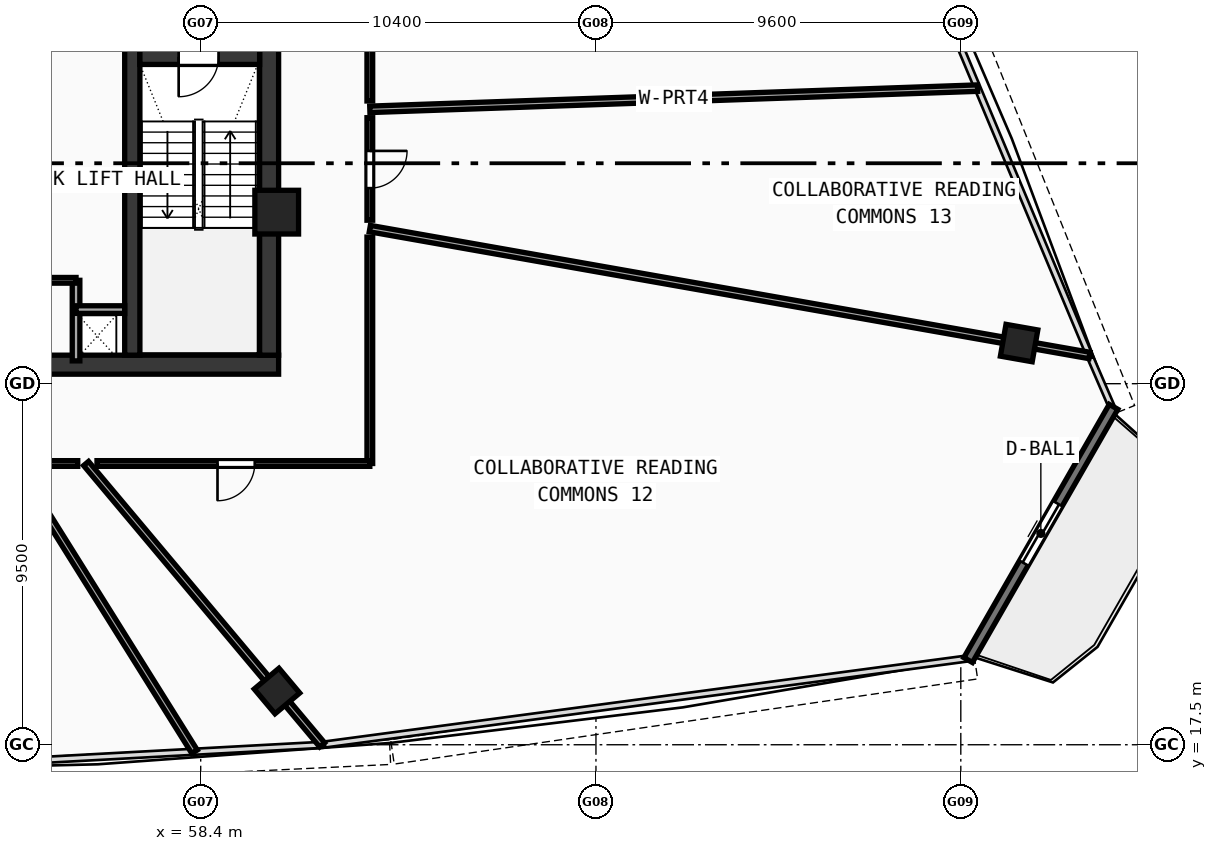
"""IFC4 building model, lengths in metres.
Left out: names, types, materials, properties, quantities, classifications, styles, units other than length and angle.
Written with IfcOpenShell. Run it as: python <this file> out.ifc"""

import sys

from ifc_helpers import new_model, si_unit, direction, frame, frame_2d, origin, origin_with_axes, origin_2d, place, context, subcontext, project, spatial, rectangle, hollow_rectangle, extrude, source, transform, mapped, element, fill, save


model = new_model("IFC4")
c1 = context("Model", 3, precision=1e-05, world=origin(), true_north=direction((0.0, 1.0)))
c2 = subcontext(c1, "Body", "Model", "MODEL_VIEW")
j1 = project(units=[si_unit("LENGTHUNIT", "METRE"), si_unit("PLANEANGLEUNIT", "RADIAN")], contexts=[c1])
p1 = place(None, origin())
s1 = spatial("IfcSite", under=j1, at=p1, CompositionType="ELEMENT")
p2 = place(p1, origin())
s2 = spatial("IfcBuilding", under=s1, at=p2, CompositionType="ELEMENT")
p3 = place(p2, frame((0.0, 0.0, 255.72)))
s3 = spatial("IfcBuildingStorey", under=s2, at=p3, CompositionType="ELEMENT", Elevation=255.72)
p4 = place(p3, frame((35.55, 27.5, 0.0), z_axis=(0.0, 0.0, 1.0), x_axis=(1.0, 0.0, 0.0)))
e1 = element("IfcWall", 1, at=p4, inside=s3, PredefinedType="SHEAR", context=c2, shape_type="SweptSolid", body=[
    extrude(rectangle(XDim=24.9, YDim=0.5, at=frame_2d((12.45, 0.0))), origin(), (0.0, 0.0, 1.0), 3.47),
])
p5 = place(p3, frame((60.2, 27.75, 0.0), z_axis=(0.0, 0.0, 1.0), x_axis=(0.0, 1.0, 0.0)))
e2 = element("IfcWall", 2, at=p5, inside=s3, PredefinedType="SHEAR", context=c2, shape_type="SweptSolid", body=[
    extrude(rectangle(XDim=12.2, YDim=0.5, at=frame_2d((6.1, 0.0))), origin(), (0.0, 0.0, 1.0), 3.47),
])
p6 = place(p3, frame((56.6, 27.75, 0.0), z_axis=(0.0, 0.0, 1.0), x_axis=(0.0, 1.0, 0.0)))
e3 = element("IfcWall", 3, at=p6, inside=s3, PredefinedType="SHEAR", context=c2, shape_type="SweptSolid", body=[
    extrude(rectangle(XDim=12.2, YDim=0.4, at=frame_2d((6.1, 0.0))), origin(), (0.0, 0.0, 1.0), 3.47),
])
p7 = place(p6, frame((10.0, 0.0, 0.0)))
e4 = element("IfcOpeningElement", 4, at=p7, cuts=e3, PredefinedType="OPENING", context=c2, shape_type="SweptSolid", body=[
    extrude(rectangle(XDim=1.1, YDim=2.1, at=frame_2d((0.55, 1.05))), frame((0.0, 0.21, 0.0), z_axis=(0.0, -1.0, 0.0), x_axis=(1.0, 0.0, 0.0)), (0.0, 0.0, 1.0), 0.42),
])
p8 = place(p3, frame((56.8, 35.6, 0.0), z_axis=(0.0, 0.0, 1.0), x_axis=(1.0, 0.0, 0.0)))
e5 = element("IfcWall", 5, at=p8, inside=s3, PredefinedType="SHEAR", context=c2, shape_type="SweptSolid", body=[
    extrude(rectangle(XDim=3.15, YDim=0.4, at=frame_2d((1.575, 0.0))), origin(), (0.0, 0.0, 1.0), 3.47),
])
p9 = place(p8, frame((1.02, 0.0, 0.0)))
e6 = element("IfcOpeningElement", 6, at=p9, cuts=e5, PredefinedType="OPENING", context=c2, shape_type="SweptSolid", body=[
    extrude(rectangle(XDim=1.05, YDim=2.1, at=frame_2d((0.525, 1.05))), frame((0.0, 0.21, 0.0), z_axis=(0.0, -1.0, 0.0), x_axis=(1.0, 0.0, 0.0)), (0.0, 0.0, 1.0), 0.42),
])
m1 = source(origin(), c2, "Body", "SweptSolid", [
    extrude(hollow_rectangle(XDim=1.15, YDim=1.15, WallThickness=0.048, at=origin_2d()), origin(), (0.0, 0.0, 1.0), 3.73),
])
p10 = place(p3, frame((60.4, 31.513, -0.26), z_axis=(0.0, 0.0, 1.0), x_axis=(1.0, 0.0, 0.0)))
e7 = element("IfcColumn", 7, at=p10, inside=s3, PredefinedType="COLUMN", context=c2, shape_type="MappedRepresentation", body=[
    mapped(m1, transform((0.0, 0.0, 0.0), scale=1.0)),
])
m2 = source(origin(), c2, "Body", "SweptSolid", [
    extrude(hollow_rectangle(XDim=0.85, YDim=0.85, WallThickness=0.034, at=origin_2d()), origin(), (0.0, 0.0, 1.0), 3.73),
])
for number, where, z_axis, x_axis in (
    (8, (60.407, 18.914, -0.26), (0.0, 0.0, 1.0), (0.766, 0.643, 0.0)),
    (9, (79.934, 28.069, -0.26), (0.0, 0.0, 1.0), (0.174, 0.985, 0.0)),
):
    element("IfcColumn", number, at=place(p3, frame(where, z_axis=z_axis, x_axis=x_axis)), inside=s3, PredefinedType="COLUMN", context=c2, shape_type="MappedRepresentation", body=[
        mapped(m2, transform((0.0, 0.0, 0.0), scale=1.0)),
    ])
p11 = place(p3, frame((78.593, 19.729, 0.0), z_axis=(0.0, 0.0, 1.0), x_axis=(0.497934343816, 0.867214730761, 0.0)))
e10 = element("IfcWall", 10, at=p11, inside=s3, PredefinedType="STANDARD", context=c2, shape_type="SweptSolid", body=[
    extrude(rectangle(XDim=7.684, YDim=0.26, at=frame_2d((3.842, 0.0))), origin(), (0.0, 0.0, 1.0), 3.47),
])
p12 = place(p11, frame((2.942, 0.0, 0.0)))
e11 = element("IfcOpeningElement", 11, at=p12, cuts=e10, PredefinedType="OPENING", context=c2, shape_type="SweptSolid", body=[
    extrude(rectangle(XDim=1.8, YDim=2.15, at=frame_2d((0.9, 1.075))), frame((0.0, 0.14, 0.0), z_axis=(0.0, -1.0, 0.0), x_axis=(1.0, 0.0, 0.0)), (0.0, 0.0, 1.0), 0.28),
])
p13 = place(p3, frame((55.12, 27.6, 0.0), z_axis=(0.0, 0.0, 1.0), x_axis=(0.0, 1.0, 0.0)))
e12 = element("IfcWall", 12, at=p13, inside=s3, PredefinedType="SOLIDWALL", context=c2, shape_type="SweptSolid", body=[
    extrude(rectangle(XDim=2.12, YDim=0.2, at=frame_2d((1.06, 0.0))), origin(), (0.0, 0.0, 1.0), 3.47),
])
p14 = place(p3, frame((55.12, 28.95, 0.0), z_axis=(0.0, 0.0, 1.0), x_axis=(1.0, 0.0, 0.0)))
e13 = element("IfcWall", 13, at=p14, inside=s3, PredefinedType="SOLIDWALL", context=c2, shape_type="SweptSolid", body=[
    extrude(rectangle(XDim=1.28, YDim=0.2, at=frame_2d((0.64, 0.0))), origin(), (0.0, 0.0, 1.0), 3.47),
])
p15 = place(p3, frame((51.05, 29.72, 0.0), z_axis=(0.0, 0.0, 1.0), x_axis=(1.0, 0.0, 0.0)))
e14 = element("IfcWall", 14, at=p15, inside=s3, PredefinedType="PARTITIONING", context=c2, shape_type="SweptSolid", body=[
    extrude(rectangle(XDim=4.07, YDim=0.15, at=frame_2d((2.035, 0.0))), origin(), (0.0, 0.0, 1.0), 3.47),
])
p16 = place(p15, frame((0.5, 0.0, 0.0)))
e15 = element("IfcOpeningElement", 15, at=p16, cuts=e14, PredefinedType="OPENING", context=c2, shape_type="SweptSolid", body=[
    extrude(rectangle(XDim=0.9, YDim=2.1, at=frame_2d((0.45, 1.05))), frame((0.0, 0.085, 0.0), z_axis=(0.0, -1.0, 0.0), x_axis=(1.0, 0.0, 0.0)), (0.0, 0.0, 1.0), 0.17),
])
p17 = place(p3, frame((62.85, 34.219, 0.0), z_axis=(0.0, 0.0, 1.0), x_axis=(0.99939049717, 0.034908941063, 0.0)))
e16 = element("IfcWall", 16, at=p17, inside=s3, PredefinedType="PARTITIONING", context=c2, shape_type="SweptSolid", body=[
    extrude(rectangle(XDim=16.001, YDim=0.17, at=frame_2d((8.001, 0.0))), origin(), (0.0, 0.0, 1.0), 2.82),
])
p18 = place(p3, frame((53.499, 24.9, 0.0), z_axis=(0.0, 0.0, 1.0), x_axis=(0.529920411872, -0.848047379031, 0.0)))
e17 = element("IfcWall", 17, at=p18, inside=s3, PredefinedType="PARTITIONING", context=c2, shape_type="SweptSolid", body=[
    extrude(rectangle(XDim=8.943, YDim=0.17, at=frame_2d((4.471, 0.0))), origin(), (0.0, 0.0, 1.0), 2.82),
])
p19 = place(p3, frame((55.384, 24.9, 0.0), z_axis=(0.0, 0.0, 1.0), x_axis=(0.642795010628, -0.766038232931, 0.0)))
e18 = element("IfcWall", 18, at=p19, inside=s3, PredefinedType="PARTITIONING", context=c2, shape_type="SweptSolid", body=[
    extrude(rectangle(XDim=9.663, YDim=0.17, at=frame_2d((4.832, 0.0))), origin(), (0.0, 0.0, 1.0), 2.82),
])
p20 = place(p3, frame((62.85, 31.082, 0.0), z_axis=(0.0, 0.0, 1.0), x_axis=(0.984808346381, -0.173644812474, 0.0)))
e19 = element("IfcWall", 19, at=p20, inside=s3, PredefinedType="PARTITIONING", context=c2, shape_type="SweptSolid", body=[
    extrude(rectangle(XDim=19.228, YDim=0.17, at=frame_2d((9.614, 0.0))), origin(), (0.0, 0.0, 1.0), 2.82),
])
p21 = place(p3, frame((62.85, 38.305, 0.0), z_axis=(0.0, 0.0, 1.0), x_axis=(0.0, -1.0, 0.0)))
e20 = element("IfcWall", 20, at=p21, inside=s3, PredefinedType="PARTITIONING", context=c2, shape_type="SweptSolid", body=[
    extrude(rectangle(XDim=3.867, YDim=0.15, at=frame_2d((1.933, 0.0))), origin(), (0.0, 0.0, 1.0), 3.47),
])
p22 = place(p21, frame((1.473, 0.0, 0.0)))
e21 = element("IfcOpeningElement", 21, at=p22, cuts=e20, PredefinedType="OPENING", context=c2, shape_type="SweptSolid", body=[
    extrude(rectangle(XDim=0.92, YDim=2.1, at=frame_2d((0.46, 1.05))), frame((0.0, 0.085, 0.0), z_axis=(0.0, -1.0, 0.0), x_axis=(1.0, 0.0, 0.0)), (0.0, 0.0, 1.0), 0.17),
])
p23 = place(p3, frame((62.85, 33.999, 0.0), z_axis=(0.0, 0.0, 1.0), x_axis=(0.0, -1.0, 0.0)))
e22 = element("IfcWall", 22, at=p23, inside=s3, PredefinedType="PARTITIONING", context=c2, shape_type="SweptSolid", body=[
    extrude(rectangle(XDim=2.698, YDim=0.15, at=frame_2d((1.349, 0.0))), origin(), (0.0, 0.0, 1.0), 3.47),
])
p24 = place(p23, frame((0.874, 0.0, 0.0)))
e23 = element("IfcOpeningElement", 23, at=p24, cuts=e22, PredefinedType="OPENING", context=c2, shape_type="SweptSolid", body=[
    extrude(rectangle(XDim=0.98, YDim=2.12, at=frame_2d((0.49, 1.06))), frame((0.0, 0.085, 0.0), z_axis=(0.0, -1.0, 0.0), x_axis=(1.0, 0.0, 0.0)), (0.0, 0.0, 1.0), 0.17),
])
p25 = place(p3, frame((62.85, 30.858, 0.0), z_axis=(0.0, 0.0, 1.0), x_axis=(0.0, -1.0, 0.0)))
e24 = element("IfcWall", 24, at=p25, inside=s3, PredefinedType="PARTITIONING", context=c2, shape_type="SweptSolid", body=[
    extrude(rectangle(XDim=5.958, YDim=0.15, at=frame_2d((2.979, 0.0))), origin(), (0.0, 0.0, 1.0), 3.12),
])
p26 = place(p3, frame((62.85, 24.9, 0.0), z_axis=(0.0, 0.0, 1.0), x_axis=(-1.0, 0.0, 0.0)))
e25 = element("IfcWall", 25, at=p26, inside=s3, PredefinedType="PARTITIONING", context=c2, shape_type="SweptSolid", body=[
    extrude(rectangle(XDim=7.179, YDim=0.15, at=frame_2d((3.589, 0.0))), origin(), (0.0, 0.0, 1.0), 3.12),
])
p27 = place(p26, frame((3.028, 0.0, 0.0)))
e26 = element("IfcOpeningElement", 26, at=p27, cuts=e25, PredefinedType="OPENING", context=c2, shape_type="SweptSolid", body=[
    extrude(rectangle(XDim=0.98, YDim=2.12, at=frame_2d((0.49, 1.06))), frame((0.0, 0.085, 0.0), z_axis=(0.0, -1.0, 0.0), x_axis=(1.0, 0.0, 0.0)), (0.0, 0.0, 1.0), 0.17),
])
p28 = place(p3, frame((55.164, 24.9, 0.0), z_axis=(0.0, 0.0, 1.0), x_axis=(-1.0, 0.0, 0.0)))
e27 = element("IfcWall", 27, at=p28, inside=s3, PredefinedType="PARTITIONING", context=c2, shape_type="SweptSolid", body=[
    extrude(rectangle(XDim=1.406, YDim=0.15, at=frame_2d((0.703, 0.0))), origin(), (0.0, 0.0, 1.0), 2.82),
])
m3 = source(origin(), c2, "Body", "SweptSolid", [
    extrude(rectangle(XDim=1.8, YDim=2.15, at=frame_2d((0.9, 1.075))), frame((0.0, 0.025, 0.0), z_axis=(0.0, -1.0, 0.0), x_axis=(1.0, 0.0, 0.0)), (0.0, 0.0, 1.0), 0.05),
])
p29 = place(p12, origin_with_axes())
e28 = element("IfcDoor", 28, at=p29, inside=s3, OperationType="DOUBLE_DOOR_SLIDING", PredefinedType="DOOR", context=c2, shape_type="MappedRepresentation", body=[
    mapped(m3, transform((0.0, 0.0, 0.0), scale=1.0)),
])
fill(e11, e28)
m4 = source(origin(), c2, "Body", "SweptSolid", [
    extrude(rectangle(XDim=1.05, YDim=2.1, at=frame_2d((0.525, 1.05))), frame((0.0, 0.025, 0.0), z_axis=(0.0, -1.0, 0.0), x_axis=(1.0, 0.0, 0.0)), (0.0, 0.0, 1.0), 0.05),
])
p30 = place(p9, frame((1.05, 0.0, 0.0), z_axis=(0.0, 0.0, 1.0), x_axis=(-1.0, 0.0, 0.0)))
e29 = element("IfcDoor", 29, at=p30, inside=s3, OperationType="SINGLE_SWING_RIGHT", PredefinedType="DOOR", context=c2, shape_type="MappedRepresentation", body=[
    mapped(m4, transform((0.0, 0.0, 0.0), scale=1.0)),
])
fill(e6, e29)
m5 = source(origin(), c2, "Body", "SweptSolid", [
    extrude(rectangle(XDim=0.98, YDim=2.12, at=frame_2d((0.49, 1.06))), frame((0.0, 0.025, 0.0), z_axis=(0.0, -1.0, 0.0), x_axis=(1.0, 0.0, 0.0)), (0.0, 0.0, 1.0), 0.05),
])
p31 = place(p27, origin_with_axes())
e30 = element("IfcDoor", 30, at=p31, inside=s3, OperationType="SINGLE_SWING_RIGHT", PredefinedType="DOOR", context=c2, shape_type="MappedRepresentation", body=[
    mapped(m5, transform((0.0, 0.0, 0.0), scale=1.0)),
])
fill(e26, e30)
p32 = place(p24, origin_with_axes())
e31 = element("IfcDoor", 31, at=p32, inside=s3, OperationType="SINGLE_SWING_LEFT", PredefinedType="DOOR", context=c2, shape_type="MappedRepresentation", body=[
    mapped(m5, transform((0.0, 0.0, 0.0), scale=1.0)),
])
fill(e23, e31)
save(model, sys.argv[1])
